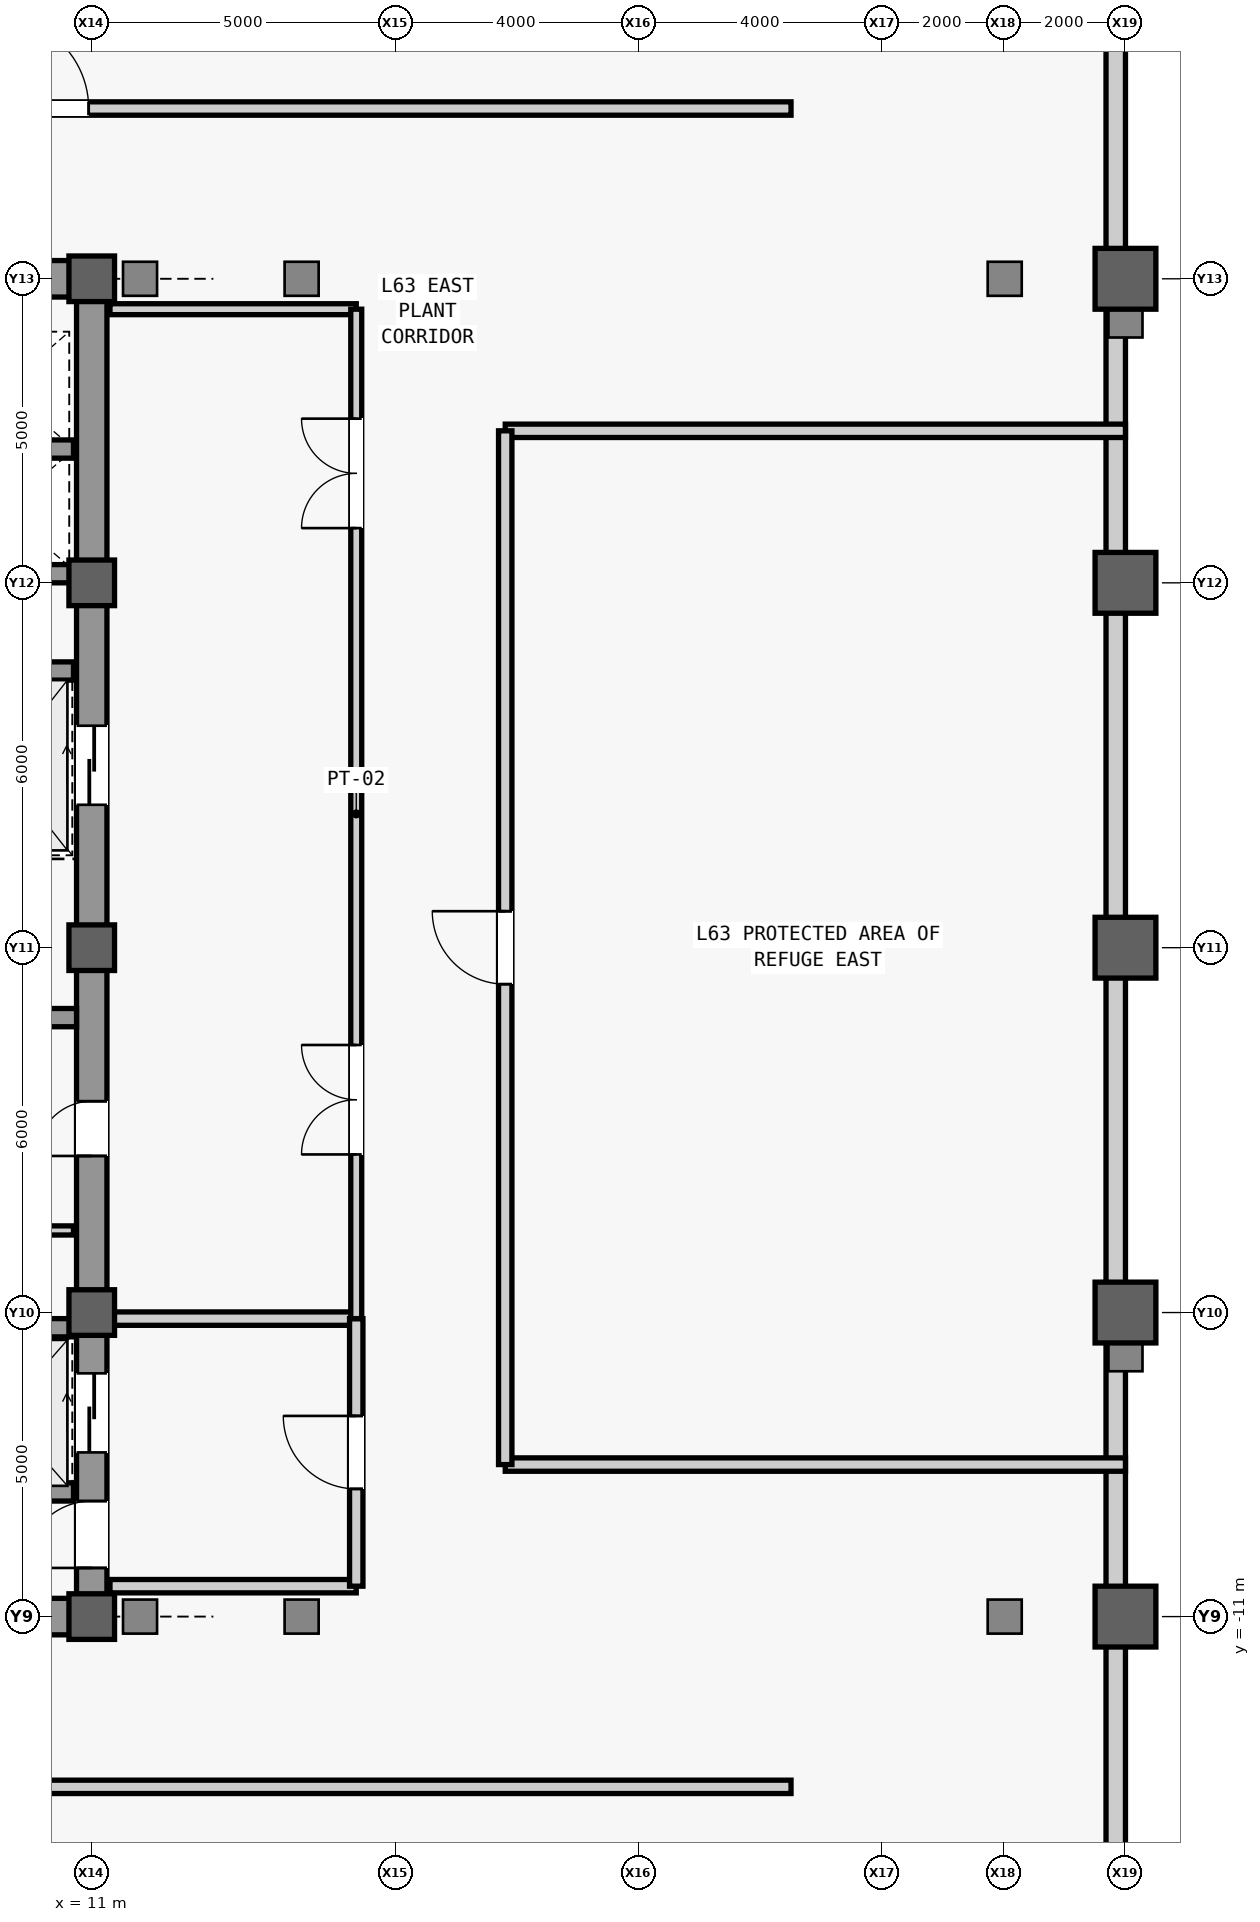
"""IFC4 building model, lengths in metres.
Left out: names, types, materials, properties, quantities, classifications, styles, units other than length and angle.
Written with IfcOpenShell. Run it as: python <this file> out.ifc"""

import sys

from ifc_helpers import new_model, si_unit, direction, frame, frame_2d, origin, origin_2d, place, context, subcontext, project, spatial, rectangle, hollow_rectangle, extrude, source, transform, mapped, element, fill, save


model = new_model("IFC4")
c1 = context("Model", 3, precision=1e-05, world=origin(), true_north=direction((0.0, 1.0)))
c2 = subcontext(c1, "Body", "Model", "MODEL_VIEW")
j1 = project(units=[si_unit("LENGTHUNIT", "METRE"), si_unit("PLANEANGLEUNIT", "RADIAN")], contexts=[c1])
p1 = place(None, origin())
s1 = spatial("IfcSite", under=j1, at=p1, CompositionType="ELEMENT")
p2 = place(p1, origin())
s2 = spatial("IfcBuilding", under=s1, at=p2, CompositionType="ELEMENT")
p3 = place(p2, frame((0.0, 0.0, 268.3)))
s3 = spatial("IfcBuildingStorey", under=s2, at=p3, CompositionType="ELEMENT", Elevation=268.3)
m1 = source(origin(), c2, "Body", "SweptSolid", [
    extrude(rectangle(XDim=22.0, YDim=0.5, at=frame_2d((11.0, 0.0))), origin(), (0.0, 0.0, 1.0), 4.98),
])
p4 = place(p3, frame((11.0, -11.0, 0.0), z_axis=(0.0, 0.0, 1.0), x_axis=(0.0, 1.0, 0.0)))
e1 = element("IfcWall", 1, at=p4, inside=s3, PredefinedType="SHEAR", context=c2, shape_type="MappedRepresentation", body=[
    mapped(m1, transform((0.0, 0.0, 0.0), scale=1.0)),
])
m2 = source(origin(), c2, "Body", "SweptSolid", [
    extrude(rectangle(XDim=1.1, YDim=2.2, at=frame_2d((0.55, 1.1))), frame((0.0, 0.26, 0.0), z_axis=(0.0, -1.0, 0.0), x_axis=(1.0, 0.0, 0.0)), (0.0, 0.0, 1.0), 0.52),
])
p5 = place(p4, frame((0.8, 0.0, 0.0)))
e2 = element("IfcOpeningElement", 2, at=p5, cuts=e1, PredefinedType="OPENING", context=c2, shape_type="MappedRepresentation", body=[
    mapped(m2, transform((0.0, 0.0, 0.0), scale=1.0)),
])
m3 = source(origin(), c2, "Body", "SweptSolid", [
    extrude(rectangle(XDim=0.9, YDim=2.15, at=frame_2d((0.45, 1.075))), frame((0.0, 0.26, 0.0), z_axis=(0.0, -1.0, 0.0), x_axis=(1.0, 0.0, 0.0)), (0.0, 0.0, 1.0), 0.52),
])
p6 = place(p4, frame((7.575, 0.0, 0.0)))
e3 = element("IfcOpeningElement", 3, at=p6, cuts=e1, PredefinedType="OPENING", context=c2, shape_type="MappedRepresentation", body=[
    mapped(m3, transform((0.0, 0.0, 0.0), scale=1.0)),
])
m4 = source(origin(), c2, "Body", "SweptSolid", [
    extrude(rectangle(XDim=1.3, YDim=2.3, at=frame_2d((0.65, 1.15))), frame((0.0, 0.26, 0.0), z_axis=(0.0, -1.0, 0.0), x_axis=(1.0, 0.0, 0.0)), (0.0, 0.0, 1.0), 0.52),
])
p7 = place(p4, frame((2.7, 0.0, 0.0)))
e4 = element("IfcOpeningElement", 4, at=p7, cuts=e1, PredefinedType="OPENING", context=c2, shape_type="MappedRepresentation", body=[
    mapped(m4, transform((0.0, 0.0, 0.0), scale=1.0)),
])
p8 = place(p4, frame((13.35, 0.0, 0.0)))
e5 = element("IfcOpeningElement", 5, at=p8, cuts=e1, PredefinedType="OPENING", context=c2, shape_type="MappedRepresentation", body=[
    mapped(m4, transform((0.0, 0.0, 0.0), scale=1.0)),
])
m5 = source(origin(), c2, "Body", "SweptSolid", [
    extrude(rectangle(XDim=5.9, YDim=0.6, at=frame_2d((2.95, 0.0))), origin(), (0.0, 0.0, 1.0), 4.98),
])
p9 = place(p3, frame((4.85, -11.0, 0.0), z_axis=(0.0, 0.0, 1.0), x_axis=(1.0, 0.0, 0.0)))
e6 = element("IfcWall", 6, at=p9, inside=s3, PredefinedType="SHEAR", context=c2, shape_type="MappedRepresentation", body=[
    mapped(m5, transform((0.0, 0.0, 0.0), scale=1.0)),
])
p10 = place(p3, frame((4.85, 11.0, 0.0), z_axis=(0.0, 0.0, 1.0), x_axis=(1.0, 0.0, 0.0)))
e7 = element("IfcWall", 7, at=p10, inside=s3, PredefinedType="SHEAR", context=c2, shape_type="MappedRepresentation", body=[
    mapped(m5, transform((0.0, 0.0, 0.0), scale=1.0)),
])
m6 = source(origin(), c2, "Body", "SweptSolid", [
    extrude(rectangle(XDim=0.9, YDim=2.15, at=frame_2d((0.45, 1.075))), frame((0.0, 0.31, 0.0), z_axis=(0.0, -1.0, 0.0), x_axis=(1.0, 0.0, 0.0)), (0.0, 0.0, 1.0), 0.62),
])
p11 = place(p10, frame((0.5, 0.0, 0.0)))
e8 = element("IfcOpeningElement", 8, at=p11, cuts=e7, PredefinedType="OPENING", context=c2, shape_type="MappedRepresentation", body=[
    mapped(m6, transform((0.0, 0.0, 0.0), scale=1.0)),
])
m7 = source(origin(), c2, "Body", "SweptSolid", [
    extrude(rectangle(XDim=5.65, YDim=0.3, at=frame_2d((2.825, 0.0))), origin(), (0.0, 0.0, 1.0), 4.98),
])
p12 = place(p3, frame((5.1, -1.15, 0.0), z_axis=(0.0, 0.0, 1.0), x_axis=(1.0, 0.0, 0.0)))
e9 = element("IfcWall", 9, at=p12, inside=s3, PredefinedType="SHEAR", context=c2, shape_type="MappedRepresentation", body=[
    mapped(m7, transform((0.0, 0.0, 0.0), scale=1.0)),
])
m8 = source(origin(), c2, "Body", "SweptSolid", [
    extrude(rectangle(XDim=0.75, YDim=0.75, at=origin_2d()), origin(), (0.0, 0.0, 1.0), 5.2),
])
for number, where, z_axis, x_axis in (
    (10, (11.0, -11.0, 0.0), (0.0, 0.0, 1.0), (1.0, 0.0, 0.0)),
    (11, (11.0, -6.0, 0.0), (0.0, 0.0, 1.0), (1.0, 0.0, 0.0)),
    (12, (11.0, 0.0, 0.0), (0.0, 0.0, 1.0), (1.0, 0.0, 0.0)),
    (13, (11.0, 6.0, 0.0), (0.0, 0.0, 1.0), (1.0, 0.0, 0.0)),
    (14, (11.0, 11.0, 0.0), (0.0, 0.0, 1.0), (1.0, 0.0, 0.0)),
):
    element("IfcColumn", number, at=place(p3, frame(where, z_axis=z_axis, x_axis=x_axis)), inside=s3, PredefinedType="COLUMN", context=c2, shape_type="MappedRepresentation", body=[
        mapped(m8, transform((0.0, 0.0, 0.0), scale=1.0)),
    ])
m9 = source(origin(), c2, "Body", "SweptSolid", [
    extrude(hollow_rectangle(XDim=1.0, YDim=1.0, WallThickness=0.055, at=origin_2d()), origin(), (0.0, 0.0, 1.0), 5.2),
])
for number, where, z_axis, x_axis in (
    (15, (28.0, -11.0, 0.0), (0.0, 0.0, 1.0), (1.0, 0.0, 0.0)),
    (16, (28.0, -6.0, 0.0), (0.0, 0.0, 1.0), (1.0, 0.0, 0.0)),
    (17, (28.0, 0.0, 0.0), (0.0, 0.0, 1.0), (1.0, 0.0, 0.0)),
    (18, (28.0, 6.0, 0.0), (0.0, 0.0, 1.0), (1.0, 0.0, 0.0)),
    (19, (28.0, 11.0, 0.0), (0.0, 0.0, 1.0), (1.0, 0.0, 0.0)),
):
    element("IfcColumn", number, at=place(p3, frame(where, z_axis=z_axis, x_axis=x_axis)), inside=s3, PredefinedType="COLUMN", context=c2, shape_type="MappedRepresentation", body=[
        mapped(m9, transform((0.0, 0.0, 0.0), scale=1.0)),
    ])
m10 = source(origin(), c2, "Body", "SweptSolid", [
    extrude(rectangle(XDim=45.0, YDim=0.32, at=frame_2d((22.5, 0.0))), origin(), (0.0, 0.0, 1.0), 4.364),
])
p13 = place(p3, frame((27.84, -22.5, 0.0), z_axis=(0.0, 0.0, 1.0), x_axis=(0.0, 1.0, 0.0)))
e20 = element("IfcWall", 20, at=p13, inside=s3, PredefinedType="STANDARD", context=c2, shape_type="MappedRepresentation", body=[
    mapped(m10, transform((0.0, 0.0, 0.0), scale=1.0)),
])
m11 = source(origin(), c2, "Body", "SweptSolid", [
    extrude(rectangle(XDim=2.2, YDim=0.3, at=frame_2d((1.1, 0.0))), origin(), (0.0, 0.0, 1.0), 4.98),
])
for number, where, z_axis, x_axis in (
    (21, (8.5, -8.95, 0.0), (0.0, 0.0, 1.0), (1.0, 0.0, 0.0)),
    (22, (8.5, -6.25, 0.0), (0.0, 0.0, 1.0), (1.0, 0.0, 0.0)),
):
    element("IfcWall", number, at=place(p3, frame(where, z_axis=z_axis, x_axis=x_axis)), inside=s3, PredefinedType="SHEAR", context=c2, shape_type="MappedRepresentation", body=[
        mapped(m11, transform((0.0, 0.0, 0.0), scale=1.0)),
    ])
m12 = source(origin(), c2, "Body", "SweptSolid", [
    extrude(rectangle(XDim=2.3, YDim=0.3, at=frame_2d((1.15, 0.0))), origin(), (0.0, 0.0, 1.0), 4.98),
])
for number, where, z_axis, x_axis in (
    (23, (8.4, 4.55, 0.0), (0.0, 0.0, 1.0), (1.0, 0.0, 0.0)),
    (24, (8.4, 6.15, 0.0), (0.0, 0.0, 1.0), (1.0, 0.0, 0.0)),
    (25, (8.4, 8.2, 0.0), (0.0, 0.0, 1.0), (1.0, 0.0, 0.0)),
):
    element("IfcWall", number, at=place(p3, frame(where, z_axis=z_axis, x_axis=x_axis)), inside=s3, PredefinedType="SHEAR", context=c2, shape_type="MappedRepresentation", body=[
        mapped(m12, transform((0.0, 0.0, 0.0), scale=1.0)),
    ])
m13 = source(origin(), c2, "Body", "SweptSolid", [
    extrude(rectangle(XDim=2.05, YDim=0.15, at=frame_2d((1.025, 0.0))), origin(), (0.0, 0.0, 1.0), 4.98),
])
p14 = place(p3, frame((8.65, -4.65, 0.0), z_axis=(0.0, 0.0, 1.0), x_axis=(1.0, 0.0, 0.0)))
e26 = element("IfcWall", 26, at=p14, inside=s3, PredefinedType="PARTITIONING", context=c2, shape_type="MappedRepresentation", body=[
    mapped(m13, transform((0.0, 0.0, 0.0), scale=1.0)),
])
m14 = source(origin(), c2, "Body", "SweptSolid", [
    extrude(rectangle(XDim=4.05, YDim=0.22, at=frame_2d((2.025, 0.0))), origin(), (0.0, 0.0, 1.0), 4.98),
])
p15 = place(p3, frame((11.3, -10.5, 0.0), z_axis=(0.0, 0.0, 1.0), x_axis=(1.0, 0.0, 0.0)))
e27 = element("IfcWall", 27, at=p15, inside=s3, PredefinedType="PARTITIONING", context=c2, shape_type="MappedRepresentation", body=[
    mapped(m14, transform((0.0, 0.0, 0.0), scale=1.0)),
])
m15 = source(origin(), c2, "Body", "SweptSolid", [
    extrude(rectangle(XDim=4.05, YDim=0.22, at=frame_2d((2.025, 0.0))), origin(), (0.0, 0.0, 1.0), 4.285),
])
p16 = place(p3, frame((11.3, -6.1, 0.0), z_axis=(0.0, 0.0, 1.0), x_axis=(1.0, 0.0, 0.0)))
e28 = element("IfcWall", 28, at=p16, inside=s3, PredefinedType="PARTITIONING", context=c2, shape_type="MappedRepresentation", body=[
    mapped(m15, transform((0.0, 0.0, 0.0), scale=1.0)),
])
m16 = source(origin(), c2, "Body", "SweptSolid", [
    extrude(rectangle(XDim=4.4, YDim=0.22, at=frame_2d((2.2, 0.0))), origin(), (0.0, 0.0, 1.0), 4.98),
])
p17 = place(p3, frame((15.35, -10.5, 0.0), z_axis=(0.0, 0.0, 1.0), x_axis=(0.0, 1.0, 0.0)))
e29 = element("IfcWall", 29, at=p17, inside=s3, PredefinedType="PARTITIONING", context=c2, shape_type="MappedRepresentation", body=[
    mapped(m16, transform((0.0, 0.0, 0.0), scale=1.0)),
])
m17 = source(origin(), c2, "Body", "SweptSolid", [
    extrude(rectangle(XDim=1.2, YDim=2.2, at=frame_2d((0.6, 1.1))), frame((0.0, 0.12, 0.0), z_axis=(0.0, -1.0, 0.0), x_axis=(1.0, 0.0, 0.0)), (0.0, 0.0, 1.0), 0.24),
])
p18 = place(p17, frame((1.6, 0.0, 0.0)))
e30 = element("IfcOpeningElement", 30, at=p18, cuts=e29, PredefinedType="OPENING", context=c2, shape_type="MappedRepresentation", body=[
    mapped(m17, transform((0.0, 0.0, 0.0), scale=1.0)),
])
m18 = source(origin(), c2, "Body", "SweptSolid", [
    extrude(rectangle(XDim=4.05, YDim=0.18, at=frame_2d((2.025, 0.0))), origin(), (0.0, 0.0, 1.0), 4.98),
])
p19 = place(p3, frame((11.3, 10.5, 0.0), z_axis=(0.0, 0.0, 1.0), x_axis=(1.0, 0.0, 0.0)))
e31 = element("IfcWall", 31, at=p19, inside=s3, PredefinedType="PARTITIONING", context=c2, shape_type="MappedRepresentation", body=[
    mapped(m18, transform((0.0, 0.0, 0.0), scale=1.0)),
])
m19 = source(origin(), c2, "Body", "SweptSolid", [
    extrude(rectangle(XDim=16.6, YDim=0.18, at=frame_2d((8.3, 0.0))), origin(), (0.0, 0.0, 1.0), 4.98),
])
p20 = place(p3, frame((15.35, -6.1, 0.0), z_axis=(0.0, 0.0, 1.0), x_axis=(0.0, 1.0, 0.0)))
e32 = element("IfcWall", 32, at=p20, inside=s3, PredefinedType="PARTITIONING", context=c2, shape_type="MappedRepresentation", body=[
    mapped(m19, transform((0.0, 0.0, 0.0), scale=1.0)),
])
m20 = source(origin(), c2, "Body", "SweptSolid", [
    extrude(rectangle(XDim=1.8, YDim=2.25, at=frame_2d((0.9, 1.125))), frame((0.0, 0.1, 0.0), z_axis=(0.0, -1.0, 0.0), x_axis=(1.0, 0.0, 0.0)), (0.0, 0.0, 1.0), 0.2),
])
p21 = place(p20, frame((2.7, 0.0, 0.0)))
e33 = element("IfcOpeningElement", 33, at=p21, cuts=e32, PredefinedType="OPENING", context=c2, shape_type="MappedRepresentation", body=[
    mapped(m20, transform((0.0, 0.0, 0.0), scale=1.0)),
])
p22 = place(p20, frame((13.0, 0.0, 0.0)))
e34 = element("IfcOpeningElement", 34, at=p22, cuts=e32, PredefinedType="OPENING", context=c2, shape_type="MappedRepresentation", body=[
    mapped(m20, transform((0.0, 0.0, 0.0), scale=1.0)),
])
m21 = source(origin(), c2, "Body", "SweptSolid", [
    extrude(rectangle(XDim=45.0, YDim=0.22, at=frame_2d((22.5, 0.0))), origin(), (0.0, 0.0, 1.0), 4.98),
])
p23 = place(p3, frame((-22.5, -13.8, 0.0), z_axis=(0.0, 0.0, 1.0), x_axis=(1.0, 0.0, 0.0)))
e35 = element("IfcWall", 35, at=p23, inside=s3, PredefinedType="PARTITIONING", context=c2, shape_type="MappedRepresentation", body=[
    mapped(m21, transform((0.0, 0.0, 0.0), scale=1.0)),
])
m22 = source(origin(), c2, "Body", "SweptSolid", [
    extrude(rectangle(XDim=1.5, YDim=2.3, at=frame_2d((0.75, 1.15))), frame((0.0, 0.12, 0.0), z_axis=(0.0, -1.0, 0.0), x_axis=(1.0, 0.0, 0.0)), (0.0, 0.0, 1.0), 0.24),
])
p24 = place(p23, frame((16.6, 0.0, 0.0)))
e36 = element("IfcOpeningElement", 36, at=p24, cuts=e35, PredefinedType="OPENING", context=c2, shape_type="MappedRepresentation", body=[
    mapped(m22, transform((0.0, 0.0, 0.0), scale=1.0)),
])
p25 = place(p23, frame((29.6, 0.0, 0.0)))
e37 = element("IfcOpeningElement", 37, at=p25, cuts=e35, PredefinedType="OPENING", context=c2, shape_type="MappedRepresentation", body=[
    mapped(m22, transform((0.0, 0.0, 0.0), scale=1.0)),
])
p26 = place(p3, frame((-22.5, 13.8, 0.0), z_axis=(0.0, 0.0, 1.0), x_axis=(1.0, 0.0, 0.0)))
e38 = element("IfcWall", 38, at=p26, inside=s3, PredefinedType="PARTITIONING", context=c2, shape_type="MappedRepresentation", body=[
    mapped(m21, transform((0.0, 0.0, 0.0), scale=1.0)),
])
p27 = place(p26, frame((13.8, 0.0, 0.0)))
e39 = element("IfcOpeningElement", 39, at=p27, cuts=e38, PredefinedType="OPENING", context=c2, shape_type="MappedRepresentation", body=[
    mapped(m22, transform((0.0, 0.0, 0.0), scale=1.0)),
])
p28 = place(p26, frame((23.35, 0.0, 0.0)))
e40 = element("IfcOpeningElement", 40, at=p28, cuts=e38, PredefinedType="OPENING", context=c2, shape_type="MappedRepresentation", body=[
    mapped(m22, transform((0.0, 0.0, 0.0), scale=1.0)),
])
p29 = place(p26, frame((31.95, 0.0, 0.0)))
e41 = element("IfcOpeningElement", 41, at=p29, cuts=e38, PredefinedType="OPENING", context=c2, shape_type="MappedRepresentation", body=[
    mapped(m22, transform((0.0, 0.0, 0.0), scale=1.0)),
])
m23 = source(origin(), c2, "Body", "SweptSolid", [
    extrude(rectangle(XDim=10.2, YDim=0.22, at=frame_2d((5.1, 0.0))), origin(), (0.0, 0.0, 1.0), 4.98),
])
for number, where, z_axis, x_axis in (
    (42, (17.8, -8.5, 0.0), (0.0, 0.0, 1.0), (1.0, 0.0, 0.0)),
    (43, (17.8, 8.5, 0.0), (0.0, 0.0, 1.0), (1.0, 0.0, 0.0)),
):
    element("IfcWall", number, at=place(p3, frame(where, z_axis=z_axis, x_axis=x_axis)), inside=s3, PredefinedType="PARTITIONING", context=c2, shape_type="MappedRepresentation", body=[
        mapped(m23, transform((0.0, 0.0, 0.0), scale=1.0)),
    ])
m24 = source(origin(), c2, "Body", "SweptSolid", [
    extrude(rectangle(XDim=17.0, YDim=0.22, at=frame_2d((8.5, 0.0))), origin(), (0.0, 0.0, 1.0), 4.98),
])
p30 = place(p3, frame((17.8, -8.5, 0.0), z_axis=(0.0, 0.0, 1.0), x_axis=(0.0, 1.0, 0.0)))
e44 = element("IfcWall", 44, at=p30, inside=s3, PredefinedType="PARTITIONING", context=c2, shape_type="MappedRepresentation", body=[
    mapped(m24, transform((0.0, 0.0, 0.0), scale=1.0)),
])
p31 = place(p30, frame((7.9, 0.0, 0.0)))
e45 = element("IfcOpeningElement", 45, at=p31, cuts=e44, PredefinedType="OPENING", context=c2, shape_type="MappedRepresentation", body=[
    mapped(m17, transform((0.0, 0.0, 0.0), scale=1.0)),
])
m25 = source(origin(), c2, "Body", "SweptSolid", [
    extrude(rectangle(XDim=1.1, YDim=2.2, at=frame_2d((0.55, 1.1))), frame((0.0, 0.025, 0.0), z_axis=(0.0, -1.0, 0.0), x_axis=(1.0, 0.0, 0.0)), (0.0, 0.0, 1.0), 0.05),
])
p32 = place(p5, origin())
e46 = element("IfcDoor", 46, at=p32, inside=s3, OperationType="SINGLE_SWING_LEFT", PredefinedType="DOOR", context=c2, shape_type="MappedRepresentation", body=[
    mapped(m25, transform((0.0, 0.0, 0.0), scale=1.0)),
])
fill(e2, e46)
m26 = source(origin(), c2, "Body", "SweptSolid", [
    extrude(rectangle(XDim=0.9, YDim=2.15, at=frame_2d((0.45, 1.075))), frame((0.0, 0.025, 0.0), z_axis=(0.0, -1.0, 0.0), x_axis=(1.0, 0.0, 0.0)), (0.0, 0.0, 1.0), 0.05),
])
p33 = place(p6, origin())
e47 = element("IfcDoor", 47, at=p33, inside=s3, OperationType="SINGLE_SWING_LEFT", PredefinedType="DOOR", context=c2, shape_type="MappedRepresentation", body=[
    mapped(m26, transform((0.0, 0.0, 0.0), scale=1.0)),
])
fill(e3, e47)
m27 = source(origin(), c2, "Body", "SweptSolid", [
    extrude(rectangle(XDim=1.2, YDim=2.2, at=frame_2d((0.6, 1.1))), frame((0.0, 0.025, 0.0), z_axis=(0.0, -1.0, 0.0), x_axis=(1.0, 0.0, 0.0)), (0.0, 0.0, 1.0), 0.05),
])
p34 = place(p18, origin())
e48 = element("IfcDoor", 48, at=p34, inside=s3, OperationType="SINGLE_SWING_RIGHT", PredefinedType="DOOR", context=c2, shape_type="MappedRepresentation", body=[
    mapped(m27, transform((0.0, 0.0, 0.0), scale=1.0)),
])
fill(e30, e48)
m28 = source(origin(), c2, "Body", "SweptSolid", [
    extrude(rectangle(XDim=1.8, YDim=2.25, at=frame_2d((0.9, 1.125))), frame((0.0, 0.025, 0.0), z_axis=(0.0, -1.0, 0.0), x_axis=(1.0, 0.0, 0.0)), (0.0, 0.0, 1.0), 0.05),
])
p35 = place(p21, origin())
e49 = element("IfcDoor", 49, at=p35, inside=s3, OperationType="SINGLE_SWING_RIGHT", PredefinedType="DOOR", context=c2, shape_type="MappedRepresentation", body=[
    mapped(m28, transform((0.0, 0.0, 0.0), scale=1.0)),
])
fill(e33, e49)
p36 = place(p22, origin())
e50 = element("IfcDoor", 50, at=p36, inside=s3, OperationType="SINGLE_SWING_LEFT", PredefinedType="DOOR", context=c2, shape_type="MappedRepresentation", body=[
    mapped(m28, transform((0.0, 0.0, 0.0), scale=1.0)),
])
fill(e34, e50)
m29 = source(origin(), c2, "Body", "SweptSolid", [
    extrude(rectangle(XDim=1.5, YDim=2.3, at=frame_2d((0.75, 1.15))), frame((0.0, 0.025, 0.0), z_axis=(0.0, -1.0, 0.0), x_axis=(1.0, 0.0, 0.0)), (0.0, 0.0, 1.0), 0.05),
])
p37 = place(p29, origin())
e51 = element("IfcDoor", 51, at=p37, inside=s3, OperationType="SINGLE_SWING_LEFT", PredefinedType="DOOR", context=c2, shape_type="MappedRepresentation", body=[
    mapped(m29, transform((0.0, 0.0, 0.0), scale=1.0)),
])
fill(e41, e51)
p38 = place(p31, origin())
e52 = element("IfcDoor", 52, at=p38, inside=s3, OperationType="SINGLE_SWING_RIGHT", PredefinedType="DOOR", context=c2, shape_type="MappedRepresentation", body=[
    mapped(m27, transform((0.0, 0.0, 0.0), scale=1.0)),
])
fill(e45, e52)
m30 = source(origin(), c2, "Body", "SweptSolid", [
    extrude(rectangle(XDim=1.3, YDim=2.3, at=frame_2d((0.65, 1.15))), frame((0.0, 0.025, 0.0), z_axis=(0.0, -1.0, 0.0), x_axis=(1.0, 0.0, 0.0)), (0.0, 0.0, 1.0), 0.05),
])
p39 = place(p7, origin())
e53 = element("IfcDoor", 53, at=p39, inside=s3, OperationType="SLIDING_TO_LEFT", PredefinedType="DOOR", context=c2, shape_type="MappedRepresentation", body=[
    mapped(m30, transform((0.0, 0.0, 0.0), scale=1.0)),
])
fill(e4, e53)
p40 = place(p8, origin())
e54 = element("IfcDoor", 54, at=p40, inside=s3, OperationType="SLIDING_TO_LEFT", PredefinedType="DOOR", context=c2, shape_type="MappedRepresentation", body=[
    mapped(m30, transform((0.0, 0.0, 0.0), scale=1.0)),
])
fill(e5, e54)
save(model, sys.argv[1])
